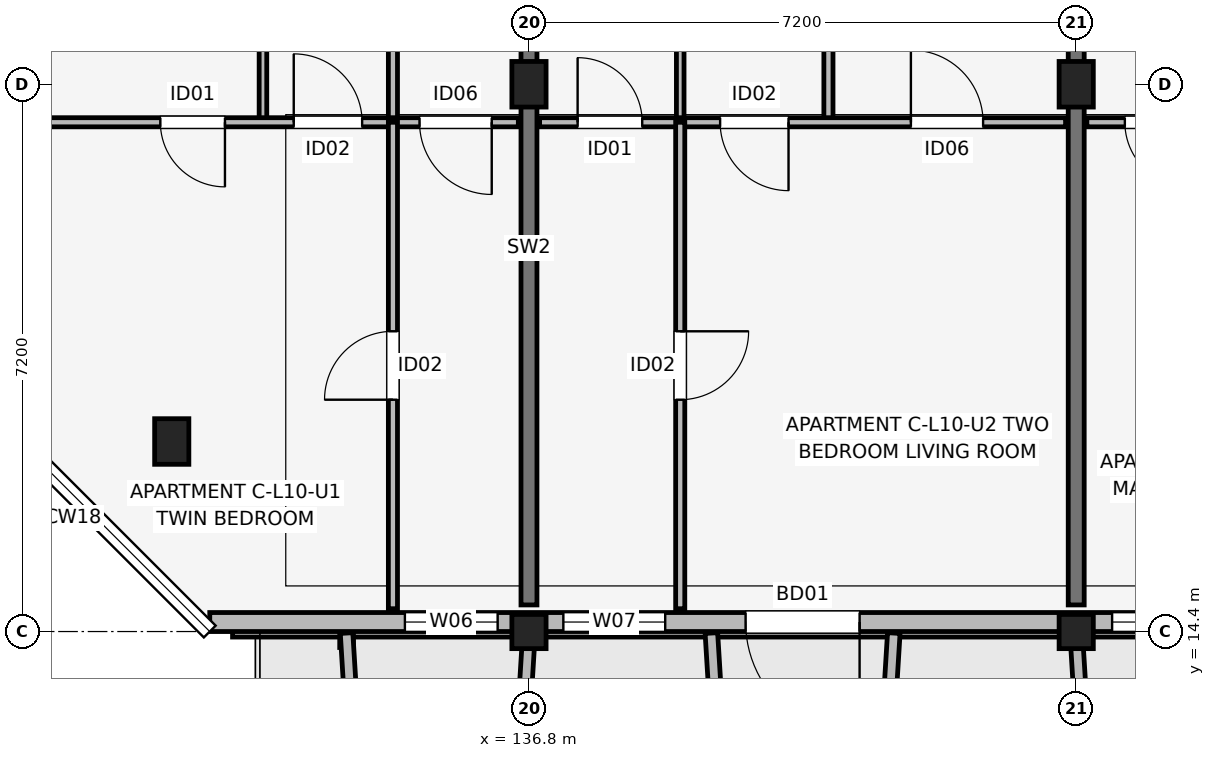
"""IFC4 building model, lengths in metres.
Left out: names, types, materials, properties, quantities, classifications, styles, units other than length and angle.
Written with IfcOpenShell. Run it as: python <this file> out.ifc"""

import sys

from ifc_helpers import new_model, si_unit, direction, frame, frame_2d, origin, origin_2d, place, context, subcontext, project, spatial, rectangle, extrude, element, fill, save


model = new_model("IFC4")
c1 = context("Model", 3, precision=1e-05, world=origin(), true_north=direction((0.0, 1.0)))
c2 = subcontext(c1, "Body", "Model", "MODEL_VIEW")
j1 = project(units=[si_unit("LENGTHUNIT", "METRE"), si_unit("PLANEANGLEUNIT", "RADIAN")], contexts=[c1])
p1 = place(None, origin())
s1 = spatial("IfcSite", under=j1, at=p1, CompositionType="ELEMENT")
p2 = place(p1, origin())
s2 = spatial("IfcBuilding", under=s1, at=p2, CompositionType="ELEMENT")
p3 = place(p2, frame((0.0, 0.0, 33.9)))
s3 = spatial("IfcBuildingStorey", under=s2, at=p3, CompositionType="ELEMENT", Elevation=33.9)
p4 = place(p3, frame((132.1, 16.9, 0.0), z_axis=(0.0, 0.0, 1.0), x_axis=(1.0, 0.0, 0.0)))
e1 = element("IfcColumn", 1, at=p4, inside=s3, PredefinedType="COLUMN", context=c2, shape_type="SweptSolid", body=[
    extrude(rectangle(XDim=0.45, YDim=0.6, at=origin_2d()), origin(), (0.0, 0.0, 1.0), 3.15),
])
p5 = place(p3, frame((136.8, 14.4, 0.0), z_axis=(0.0, 0.0, 1.0), x_axis=(1.0, 0.0, 0.0)))
e2 = element("IfcColumn", 2, at=p5, inside=s3, PredefinedType="COLUMN", context=c2, shape_type="SweptSolid", body=[
    extrude(rectangle(XDim=0.45, YDim=0.45, at=origin_2d()), origin(), (0.0, 0.0, 1.0), 3.15),
])
p6 = place(p3, frame((136.8, 21.6, 0.0), z_axis=(0.0, 0.0, 1.0), x_axis=(1.0, 0.0, 0.0)))
e3 = element("IfcColumn", 3, at=p6, inside=s3, PredefinedType="COLUMN", context=c2, shape_type="SweptSolid", body=[
    extrude(rectangle(XDim=0.45, YDim=0.6, at=origin_2d()), origin(), (0.0, 0.0, 1.0), 3.15),
])
p7 = place(p3, frame((144.0, 14.4, 0.0), z_axis=(0.0, 0.0, 1.0), x_axis=(1.0, 0.0, 0.0)))
e4 = element("IfcColumn", 4, at=p7, inside=s3, PredefinedType="COLUMN", context=c2, shape_type="SweptSolid", body=[
    extrude(rectangle(XDim=0.45, YDim=0.45, at=origin_2d()), origin(), (0.0, 0.0, 1.0), 3.15),
])
p8 = place(p3, frame((144.0, 21.6, 0.0), z_axis=(0.0, 0.0, 1.0), x_axis=(1.0, 0.0, 0.0)))
e5 = element("IfcColumn", 5, at=p8, inside=s3, PredefinedType="COLUMN", context=c2, shape_type="SweptSolid", body=[
    extrude(rectangle(XDim=0.45, YDim=0.6, at=origin_2d()), origin(), (0.0, 0.0, 1.0), 3.15),
])
for number, where, z_axis, x_axis in (
    (6, (136.8, 14.75, 0.0), (0.0, 0.0, 1.0), (0.0, 1.0, 0.0)),
    (7, (144.0, 14.75, 0.0), (0.0, 0.0, 1.0), (0.0, 1.0, 0.0)),
):
    element("IfcWall", number, at=place(p3, frame(where, z_axis=z_axis, x_axis=x_axis)), inside=s3, PredefinedType="SHEAR", context=c2, shape_type="SweptSolid", body=[
        extrude(rectangle(XDim=9.4, YDim=0.21, at=frame_2d((4.7, 0.0))), origin(), (0.0, 0.0, 1.0), 3.15),
    ])
p9 = place(p3, frame((132.6, 14.525, 0.0), z_axis=(0.0, 0.0, 1.0), x_axis=(1.0, 0.0, 0.0)))
e8 = element("IfcWall", 8, at=p9, inside=s3, PredefinedType="SOLIDWALL", context=c2, shape_type="SweptSolid", body=[
    extrude(rectangle(XDim=30.0, YDim=0.25, at=frame_2d((15.0, 0.0))), origin(), (0.0, 0.0, 1.0), 2.45),
])
p10 = place(p9, frame((8.55, 0.0, 0.0), z_axis=(0.0, 0.0, 1.0), x_axis=(-1.0, 0.0, 0.0)))
e9 = element("IfcOpeningElement", 9, at=p10, cuts=e8, PredefinedType="OPENING", context=c2, shape_type="SweptSolid", body=[
    extrude(rectangle(XDim=1.5, YDim=2.15, at=frame_2d((0.75, 1.075))), frame((0.0, 0.135, 0.0), z_axis=(0.0, -1.0, 0.0), x_axis=(1.0, 0.0, 0.0)), (0.0, 0.0, 1.0), 0.27),
])
p11 = place(p9, frame((23.1, 0.0, 0.0), z_axis=(0.0, 0.0, 1.0), x_axis=(-1.0, 0.0, 0.0)))
e10 = element("IfcOpeningElement", 10, at=p11, cuts=e8, PredefinedType="OPENING", context=c2, shape_type="SweptSolid", body=[
    extrude(rectangle(XDim=1.8, YDim=2.15, at=frame_2d((0.9, 1.075))), frame((0.0, 0.135, 0.0), z_axis=(0.0, -1.0, 0.0), x_axis=(1.0, 0.0, 0.0)), (0.0, 0.0, 1.0), 0.27),
])
p12 = place(p9, frame((2.567, 0.0, 0.75)))
e11 = element("IfcOpeningElement", 11, at=p12, cuts=e8, PredefinedType="OPENING", context=c2, shape_type="SweptSolid", body=[
    extrude(rectangle(XDim=1.22, YDim=1.5, at=frame_2d((0.61, 0.75))), frame((0.0, 0.135, 0.0), z_axis=(0.0, -1.0, 0.0), x_axis=(1.0, 0.0, 0.0)), (0.0, 0.0, 1.0), 0.27),
])
p13 = place(p9, frame((4.653, 0.0, 0.75)))
e12 = element("IfcOpeningElement", 12, at=p13, cuts=e8, PredefinedType="OPENING", context=c2, shape_type="SweptSolid", body=[
    extrude(rectangle(XDim=1.34, YDim=1.55, at=frame_2d((0.67, 0.775))), frame((0.0, 0.135, 0.0), z_axis=(0.0, -1.0, 0.0), x_axis=(1.0, 0.0, 0.0)), (0.0, 0.0, 1.0), 0.27),
])
p14 = place(p9, frame((11.873, 0.0, 0.7)))
e13 = element("IfcOpeningElement", 13, at=p14, cuts=e8, PredefinedType="OPENING", context=c2, shape_type="SweptSolid", body=[
    extrude(rectangle(XDim=1.72, YDim=1.6, at=frame_2d((0.86, 0.8))), frame((0.0, 0.135, 0.0), z_axis=(0.0, -1.0, 0.0), x_axis=(1.0, 0.0, 0.0)), (0.0, 0.0, 1.0), 0.27),
])
p15 = place(p9, frame((16.968, 0.0, 0.75)))
e14 = element("IfcOpeningElement", 14, at=p15, cuts=e8, PredefinedType="OPENING", context=c2, shape_type="SweptSolid", body=[
    extrude(rectangle(XDim=0.6, YDim=1.25, at=frame_2d((0.3, 0.625))), frame((0.0, 0.135, 0.0), z_axis=(0.0, -1.0, 0.0), x_axis=(1.0, 0.0, 0.0)), (0.0, 0.0, 1.0), 0.27),
])
p16 = place(p9, frame((19.488, 0.0, 0.75)))
e15 = element("IfcOpeningElement", 15, at=p16, cuts=e8, PredefinedType="OPENING", context=c2, shape_type="SweptSolid", body=[
    extrude(rectangle(XDim=0.72, YDim=1.35, at=frame_2d((0.36, 0.675))), frame((0.0, 0.135, 0.0), z_axis=(0.0, -1.0, 0.0), x_axis=(1.0, 0.0, 0.0)), (0.0, 0.0, 1.0), 0.27),
])
p17 = place(p9, frame((26.528, 0.0, 0.75)))
e16 = element("IfcOpeningElement", 16, at=p17, cuts=e8, PredefinedType="OPENING", context=c2, shape_type="SweptSolid", body=[
    extrude(rectangle(XDim=0.85, YDim=1.4, at=frame_2d((0.425, 0.7))), frame((0.0, 0.135, 0.0), z_axis=(0.0, -1.0, 0.0), x_axis=(1.0, 0.0, 0.0)), (0.0, 0.0, 1.0), 0.27),
])
p18 = place(p9, frame((28.525, 0.0, 0.75)))
e17 = element("IfcOpeningElement", 17, at=p18, cuts=e8, PredefinedType="OPENING", context=c2, shape_type="SweptSolid", body=[
    extrude(rectangle(XDim=0.98, YDim=1.45, at=frame_2d((0.49, 0.725))), frame((0.0, 0.135, 0.0), z_axis=(0.0, -1.0, 0.0), x_axis=(1.0, 0.0, 0.0)), (0.0, 0.0, 1.0), 0.27),
])
for number, where, z_axis, x_axis in (
    (18, (134.4, 14.38, 0.0), (0.0, 0.0, 1.0), (0.061, -0.998, 0.0)),
    (19, (136.8, 14.38, 0.0), (0.0, 0.0, 1.0), (-0.061, -0.998, 0.0)),
):
    element("IfcWall", number, at=place(p3, frame(where, z_axis=z_axis, x_axis=x_axis)), inside=s3, PredefinedType="ELEMENTEDWALL", context=c2, shape_type="SweptSolid", body=[
        extrude(rectangle(XDim=1.964, YDim=0.165, at=frame_2d((0.982, 0.0))), origin(), (0.0, 0.0, 1.0), 2.95),
    ])
for number, where, z_axis, x_axis in (
    (20, (139.2, 14.38, 0.0), (0.0, 0.0, 1.0), (0.061, -0.998, 0.0)),
    (21, (141.6, 14.38, 0.0), (0.0, 0.0, 1.0), (-0.061, -0.998, 0.0)),
):
    element("IfcWall", number, at=place(p3, frame(where, z_axis=z_axis, x_axis=x_axis)), inside=s3, PredefinedType="ELEMENTEDWALL", context=c2, shape_type="SweptSolid", body=[
        extrude(rectangle(XDim=1.964, YDim=0.165, at=frame_2d((0.982, 0.0))), origin(), (0.0, 0.0, 1.0), 2.53),
    ])
p19 = place(p3, frame((144.0, 14.38, 0.0), z_axis=(0.0, 0.0, 1.0), x_axis=(0.061170732449, -0.998127317276, 0.0)))
e22 = element("IfcWall", 22, at=p19, inside=s3, PredefinedType="ELEMENTEDWALL", context=c2, shape_type="SweptSolid", body=[
    extrude(rectangle(XDim=1.964, YDim=0.165, at=frame_2d((0.982, 0.0))), origin(), (0.0, 0.0, 1.0), 2.58),
])
p20 = place(p3, frame((133.3, 21.1, 0.0), z_axis=(0.0, 0.0, 1.0), x_axis=(0.0, 1.0, 0.0)))
e23 = element("IfcWall", 23, at=p20, inside=s3, PredefinedType="PARTITIONING", context=c2, shape_type="SweptSolid", body=[
    extrude(rectangle(XDim=3.2, YDim=0.1, at=frame_2d((1.6, 0.0))), origin(), (0.0, 0.0, 1.0), 2.38),
])
p21 = place(p3, frame((135.01, 21.1, 0.0), z_axis=(0.0, 0.0, 1.0), x_axis=(0.0, 1.0, 0.0)))
e24 = element("IfcWall", 24, at=p21, inside=s3, PredefinedType="PARTITIONING", context=c2, shape_type="SweptSolid", body=[
    extrude(rectangle(XDim=3.2, YDim=0.12, at=frame_2d((1.6, 0.0))), origin(), (0.0, 0.0, 1.0), 2.38),
])
p22 = place(p3, frame((129.74, 21.1, 0.0), z_axis=(0.0, 0.0, 1.0), x_axis=(1.0, 0.0, 0.0)))
e25 = element("IfcWall", 25, at=p22, inside=s3, PredefinedType="PARTITIONING", context=c2, shape_type="SweptSolid", body=[
    extrude(rectangle(XDim=6.92, YDim=0.12, at=frame_2d((3.46, 0.0))), origin(), (0.0, 0.0, 1.0), 2.38),
])
p23 = place(p22, frame((3.06, 0.0, 0.0), z_axis=(0.0, 0.0, 1.0), x_axis=(-1.0, 0.0, 0.0)))
e26 = element("IfcOpeningElement", 26, at=p23, cuts=e25, PredefinedType="OPENING", context=c2, shape_type="SweptSolid", body=[
    extrude(rectangle(XDim=0.85, YDim=2.08, at=frame_2d((0.425, 1.04))), frame((0.0, 0.07, 0.0), z_axis=(0.0, -1.0, 0.0), x_axis=(1.0, 0.0, 0.0)), (0.0, 0.0, 1.0), 0.14),
])
p24 = place(p22, frame((3.965, 0.0, 0.0)))
e27 = element("IfcOpeningElement", 27, at=p24, cuts=e25, PredefinedType="OPENING", context=c2, shape_type="SweptSolid", body=[
    extrude(rectangle(XDim=0.9, YDim=2.08, at=frame_2d((0.45, 1.04))), frame((0.0, 0.07, 0.0), z_axis=(0.0, -1.0, 0.0), x_axis=(1.0, 0.0, 0.0)), (0.0, 0.0, 1.0), 0.14),
])
p25 = place(p22, frame((6.57, 0.0, 0.0), z_axis=(0.0, 0.0, 1.0), x_axis=(-1.0, 0.0, 0.0)))
e28 = element("IfcOpeningElement", 28, at=p25, cuts=e25, PredefinedType="OPENING", context=c2, shape_type="SweptSolid", body=[
    extrude(rectangle(XDim=0.95, YDim=2.08, at=frame_2d((0.475, 1.04))), frame((0.0, 0.07, 0.0), z_axis=(0.0, -1.0, 0.0), x_axis=(1.0, 0.0, 0.0)), (0.0, 0.0, 1.0), 0.14),
])
p26 = place(p3, frame((135.01, 14.7, 0.0), z_axis=(0.0, 0.0, 1.0), x_axis=(0.0, 1.0, 0.0)))
e29 = element("IfcWall", 29, at=p26, inside=s3, PredefinedType="PARTITIONING", context=c2, shape_type="SweptSolid", body=[
    extrude(rectangle(XDim=6.4, YDim=0.12, at=frame_2d((3.2, 0.0))), origin(), (0.0, 0.0, 1.0), 2.38),
])
p27 = place(p26, frame((2.75, 0.0, 0.0)))
e30 = element("IfcOpeningElement", 30, at=p27, cuts=e29, PredefinedType="OPENING", context=c2, shape_type="SweptSolid", body=[
    extrude(rectangle(XDim=0.9, YDim=2.08, at=frame_2d((0.45, 1.04))), frame((0.0, 0.07, 0.0), z_axis=(0.0, -1.0, 0.0), x_axis=(1.0, 0.0, 0.0)), (0.0, 0.0, 1.0), 0.14),
])
p28 = place(p3, frame((138.79, 21.1, 0.0), z_axis=(0.0, 0.0, 1.0), x_axis=(0.0, 1.0, 0.0)))
e31 = element("IfcWall", 31, at=p28, inside=s3, PredefinedType="PARTITIONING", context=c2, shape_type="SweptSolid", body=[
    extrude(rectangle(XDim=3.2, YDim=0.1, at=frame_2d((1.6, 0.0))), origin(), (0.0, 0.0, 1.0), 2.38),
])
p29 = place(p3, frame((140.74, 21.1, 0.0), z_axis=(0.0, 0.0, 1.0), x_axis=(0.0, 1.0, 0.0)))
e32 = element("IfcWall", 32, at=p29, inside=s3, PredefinedType="PARTITIONING", context=c2, shape_type="SweptSolid", body=[
    extrude(rectangle(XDim=3.2, YDim=0.12, at=frame_2d((1.6, 0.0))), origin(), (0.0, 0.0, 1.0), 2.38),
])
p30 = place(p3, frame((136.94, 21.1, 0.0), z_axis=(0.0, 0.0, 1.0), x_axis=(1.0, 0.0, 0.0)))
e33 = element("IfcWall", 33, at=p30, inside=s3, PredefinedType="PARTITIONING", context=c2, shape_type="SweptSolid", body=[
    extrude(rectangle(XDim=6.92, YDim=0.12, at=frame_2d((3.46, 0.0))), origin(), (0.0, 0.0, 1.0), 2.38),
])
p31 = place(p30, frame((0.5, 0.0, 0.0)))
e34 = element("IfcOpeningElement", 34, at=p31, cuts=e33, PredefinedType="OPENING", context=c2, shape_type="SweptSolid", body=[
    extrude(rectangle(XDim=0.85, YDim=2.08, at=frame_2d((0.425, 1.04))), frame((0.0, 0.07, 0.0), z_axis=(0.0, -1.0, 0.0), x_axis=(1.0, 0.0, 0.0)), (0.0, 0.0, 1.0), 0.14),
])
p32 = place(p30, frame((3.275, 0.0, 0.0), z_axis=(0.0, 0.0, 1.0), x_axis=(-1.0, 0.0, 0.0)))
e35 = element("IfcOpeningElement", 35, at=p32, cuts=e33, PredefinedType="OPENING", context=c2, shape_type="SweptSolid", body=[
    extrude(rectangle(XDim=0.9, YDim=2.08, at=frame_2d((0.45, 1.04))), frame((0.0, 0.07, 0.0), z_axis=(0.0, -1.0, 0.0), x_axis=(1.0, 0.0, 0.0)), (0.0, 0.0, 1.0), 0.14),
])
p33 = place(p30, frame((4.885, 0.0, 0.0)))
e36 = element("IfcOpeningElement", 36, at=p33, cuts=e33, PredefinedType="OPENING", context=c2, shape_type="SweptSolid", body=[
    extrude(rectangle(XDim=0.95, YDim=2.08, at=frame_2d((0.475, 1.04))), frame((0.0, 0.07, 0.0), z_axis=(0.0, -1.0, 0.0), x_axis=(1.0, 0.0, 0.0)), (0.0, 0.0, 1.0), 0.14),
])
p34 = place(p3, frame((138.79, 14.7, 0.0), z_axis=(0.0, 0.0, 1.0), x_axis=(0.0, 1.0, 0.0)))
e37 = element("IfcWall", 37, at=p34, inside=s3, PredefinedType="PARTITIONING", context=c2, shape_type="SweptSolid", body=[
    extrude(rectangle(XDim=6.4, YDim=0.12, at=frame_2d((3.2, 0.0))), origin(), (0.0, 0.0, 1.0), 2.38),
])
p35 = place(p34, frame((3.65, 0.0, 0.0), z_axis=(0.0, 0.0, 1.0), x_axis=(-1.0, 0.0, 0.0)))
e38 = element("IfcOpeningElement", 38, at=p35, cuts=e37, PredefinedType="OPENING", context=c2, shape_type="SweptSolid", body=[
    extrude(rectangle(XDim=0.9, YDim=2.08, at=frame_2d((0.45, 1.04))), frame((0.0, 0.07, 0.0), z_axis=(0.0, -1.0, 0.0), x_axis=(1.0, 0.0, 0.0)), (0.0, 0.0, 1.0), 0.14),
])
p36 = place(p3, frame((144.14, 21.1, 0.0), z_axis=(0.0, 0.0, 1.0), x_axis=(1.0, 0.0, 0.0)))
e39 = element("IfcWall", 39, at=p36, inside=s3, PredefinedType="PARTITIONING", context=c2, shape_type="SweptSolid", body=[
    extrude(rectangle(XDim=6.92, YDim=0.12, at=frame_2d((3.46, 0.0))), origin(), (0.0, 0.0, 1.0), 2.38),
])
p37 = place(p36, frame((1.35, 0.0, 0.0), z_axis=(0.0, 0.0, 1.0), x_axis=(-1.0, 0.0, 0.0)))
e40 = element("IfcOpeningElement", 40, at=p37, cuts=e39, PredefinedType="OPENING", context=c2, shape_type="SweptSolid", body=[
    extrude(rectangle(XDim=0.85, YDim=2.08, at=frame_2d((0.425, 1.04))), frame((0.0, 0.07, 0.0), z_axis=(0.0, -1.0, 0.0), x_axis=(1.0, 0.0, 0.0)), (0.0, 0.0, 1.0), 0.14),
])
p38 = place(p36, frame((2.525, 0.0, 0.0)))
e41 = element("IfcOpeningElement", 41, at=p38, cuts=e39, PredefinedType="OPENING", context=c2, shape_type="SweptSolid", body=[
    extrude(rectangle(XDim=0.9, YDim=2.08, at=frame_2d((0.45, 1.04))), frame((0.0, 0.07, 0.0), z_axis=(0.0, -1.0, 0.0), x_axis=(1.0, 0.0, 0.0)), (0.0, 0.0, 1.0), 0.14),
])
p39 = place(p36, frame((5.985, 0.0, 0.0), z_axis=(0.0, 0.0, 1.0), x_axis=(-1.0, 0.0, 0.0)))
e42 = element("IfcOpeningElement", 42, at=p39, cuts=e39, PredefinedType="OPENING", context=c2, shape_type="SweptSolid", body=[
    extrude(rectangle(XDim=0.95, YDim=2.08, at=frame_2d((0.475, 1.04))), frame((0.0, 0.07, 0.0), z_axis=(0.0, -1.0, 0.0), x_axis=(1.0, 0.0, 0.0)), (0.0, 0.0, 1.0), 0.14),
])
p40 = place(p10, origin())
e43 = element("IfcDoor", 43, at=p40, inside=s3, OperationType="SINGLE_SWING_RIGHT", PredefinedType="DOOR", context=c2, shape_type="SweptSolid", body=[
    extrude(rectangle(XDim=1.5, YDim=2.15, at=frame_2d((0.75, 1.075))), frame((0.0, 0.025, 0.0), z_axis=(0.0, -1.0, 0.0), x_axis=(1.0, 0.0, 0.0)), (0.0, 0.0, 1.0), 0.05),
])
fill(e9, e43)
p41 = place(p12, origin())
e44 = element("IfcWindow", 44, at=p41, inside=s3, PartitioningType="SINGLE_PANEL", PredefinedType="WINDOW", context=c2, shape_type="SweptSolid", body=[
    extrude(rectangle(XDim=1.22, YDim=1.5, at=frame_2d((0.61, 0.75))), frame((0.0, 0.03, 0.0), z_axis=(0.0, -1.0, 0.0), x_axis=(1.0, 0.0, 0.0)), (0.0, 0.0, 1.0), 0.06),
])
fill(e11, e44)
p42 = place(p13, origin())
e45 = element("IfcWindow", 45, at=p42, inside=s3, PartitioningType="SINGLE_PANEL", PredefinedType="WINDOW", context=c2, shape_type="SweptSolid", body=[
    extrude(rectangle(XDim=1.34, YDim=1.55, at=frame_2d((0.67, 0.775))), frame((0.0, 0.03, 0.0), z_axis=(0.0, -1.0, 0.0), x_axis=(1.0, 0.0, 0.0)), (0.0, 0.0, 1.0), 0.06),
])
fill(e12, e45)
p43 = place(p14, origin())
e46 = element("IfcWindow", 46, at=p43, inside=s3, PartitioningType="SINGLE_PANEL", PredefinedType="WINDOW", context=c2, shape_type="SweptSolid", body=[
    extrude(rectangle(XDim=1.72, YDim=1.6, at=frame_2d((0.86, 0.8))), frame((0.0, 0.03, 0.0), z_axis=(0.0, -1.0, 0.0), x_axis=(1.0, 0.0, 0.0)), (0.0, 0.0, 1.0), 0.06),
])
fill(e13, e46)
p44 = place(p23, origin())
e47 = element("IfcDoor", 47, at=p44, inside=s3, OperationType="SINGLE_SWING_RIGHT", PredefinedType="DOOR", context=c2, shape_type="SweptSolid", body=[
    extrude(rectangle(XDim=0.85, YDim=2.08, at=frame_2d((0.425, 1.04))), frame((0.0, 0.025, 0.0), z_axis=(0.0, -1.0, 0.0), x_axis=(1.0, 0.0, 0.0)), (0.0, 0.0, 1.0), 0.05),
])
fill(e26, e47)
p45 = place(p24, origin())
e48 = element("IfcDoor", 48, at=p45, inside=s3, OperationType="SINGLE_SWING_LEFT", PredefinedType="DOOR", context=c2, shape_type="SweptSolid", body=[
    extrude(rectangle(XDim=0.9, YDim=2.08, at=frame_2d((0.45, 1.04))), frame((0.0, 0.025, 0.0), z_axis=(0.0, -1.0, 0.0), x_axis=(1.0, 0.0, 0.0)), (0.0, 0.0, 1.0), 0.05),
])
fill(e27, e48)
p46 = place(p25, origin())
e49 = element("IfcDoor", 49, at=p46, inside=s3, OperationType="SINGLE_SWING_RIGHT", PredefinedType="DOOR", context=c2, shape_type="SweptSolid", body=[
    extrude(rectangle(XDim=0.95, YDim=2.08, at=frame_2d((0.475, 1.04))), frame((0.0, 0.025, 0.0), z_axis=(0.0, -1.0, 0.0), x_axis=(1.0, 0.0, 0.0)), (0.0, 0.0, 1.0), 0.05),
])
fill(e28, e49)
p47 = place(p27, origin())
e50 = element("IfcDoor", 50, at=p47, inside=s3, OperationType="SINGLE_SWING_LEFT", PredefinedType="DOOR", context=c2, shape_type="SweptSolid", body=[
    extrude(rectangle(XDim=0.9, YDim=2.08, at=frame_2d((0.45, 1.04))), frame((0.0, 0.025, 0.0), z_axis=(0.0, -1.0, 0.0), x_axis=(1.0, 0.0, 0.0)), (0.0, 0.0, 1.0), 0.05),
])
fill(e30, e50)
p48 = place(p31, origin())
e51 = element("IfcDoor", 51, at=p48, inside=s3, OperationType="SINGLE_SWING_LEFT", PredefinedType="DOOR", context=c2, shape_type="SweptSolid", body=[
    extrude(rectangle(XDim=0.85, YDim=2.08, at=frame_2d((0.425, 1.04))), frame((0.0, 0.025, 0.0), z_axis=(0.0, -1.0, 0.0), x_axis=(1.0, 0.0, 0.0)), (0.0, 0.0, 1.0), 0.05),
])
fill(e34, e51)
p49 = place(p32, origin())
e52 = element("IfcDoor", 52, at=p49, inside=s3, OperationType="SINGLE_SWING_RIGHT", PredefinedType="DOOR", context=c2, shape_type="SweptSolid", body=[
    extrude(rectangle(XDim=0.9, YDim=2.08, at=frame_2d((0.45, 1.04))), frame((0.0, 0.025, 0.0), z_axis=(0.0, -1.0, 0.0), x_axis=(1.0, 0.0, 0.0)), (0.0, 0.0, 1.0), 0.05),
])
fill(e35, e52)
p50 = place(p33, origin())
e53 = element("IfcDoor", 53, at=p50, inside=s3, OperationType="SINGLE_SWING_LEFT", PredefinedType="DOOR", context=c2, shape_type="SweptSolid", body=[
    extrude(rectangle(XDim=0.95, YDim=2.08, at=frame_2d((0.475, 1.04))), frame((0.0, 0.025, 0.0), z_axis=(0.0, -1.0, 0.0), x_axis=(1.0, 0.0, 0.0)), (0.0, 0.0, 1.0), 0.05),
])
fill(e36, e53)
p51 = place(p35, origin())
e54 = element("IfcDoor", 54, at=p51, inside=s3, OperationType="SINGLE_SWING_RIGHT", PredefinedType="DOOR", context=c2, shape_type="SweptSolid", body=[
    extrude(rectangle(XDim=0.9, YDim=2.08, at=frame_2d((0.45, 1.04))), frame((0.0, 0.025, 0.0), z_axis=(0.0, -1.0, 0.0), x_axis=(1.0, 0.0, 0.0)), (0.0, 0.0, 1.0), 0.05),
])
fill(e38, e54)
p52 = place(p37, origin())
e55 = element("IfcDoor", 55, at=p52, inside=s3, OperationType="SINGLE_SWING_RIGHT", PredefinedType="DOOR", context=c2, shape_type="SweptSolid", body=[
    extrude(rectangle(XDim=0.85, YDim=2.08, at=frame_2d((0.425, 1.04))), frame((0.0, 0.025, 0.0), z_axis=(0.0, -1.0, 0.0), x_axis=(1.0, 0.0, 0.0)), (0.0, 0.0, 1.0), 0.05),
])
fill(e40, e55)
save(model, sys.argv[1])
